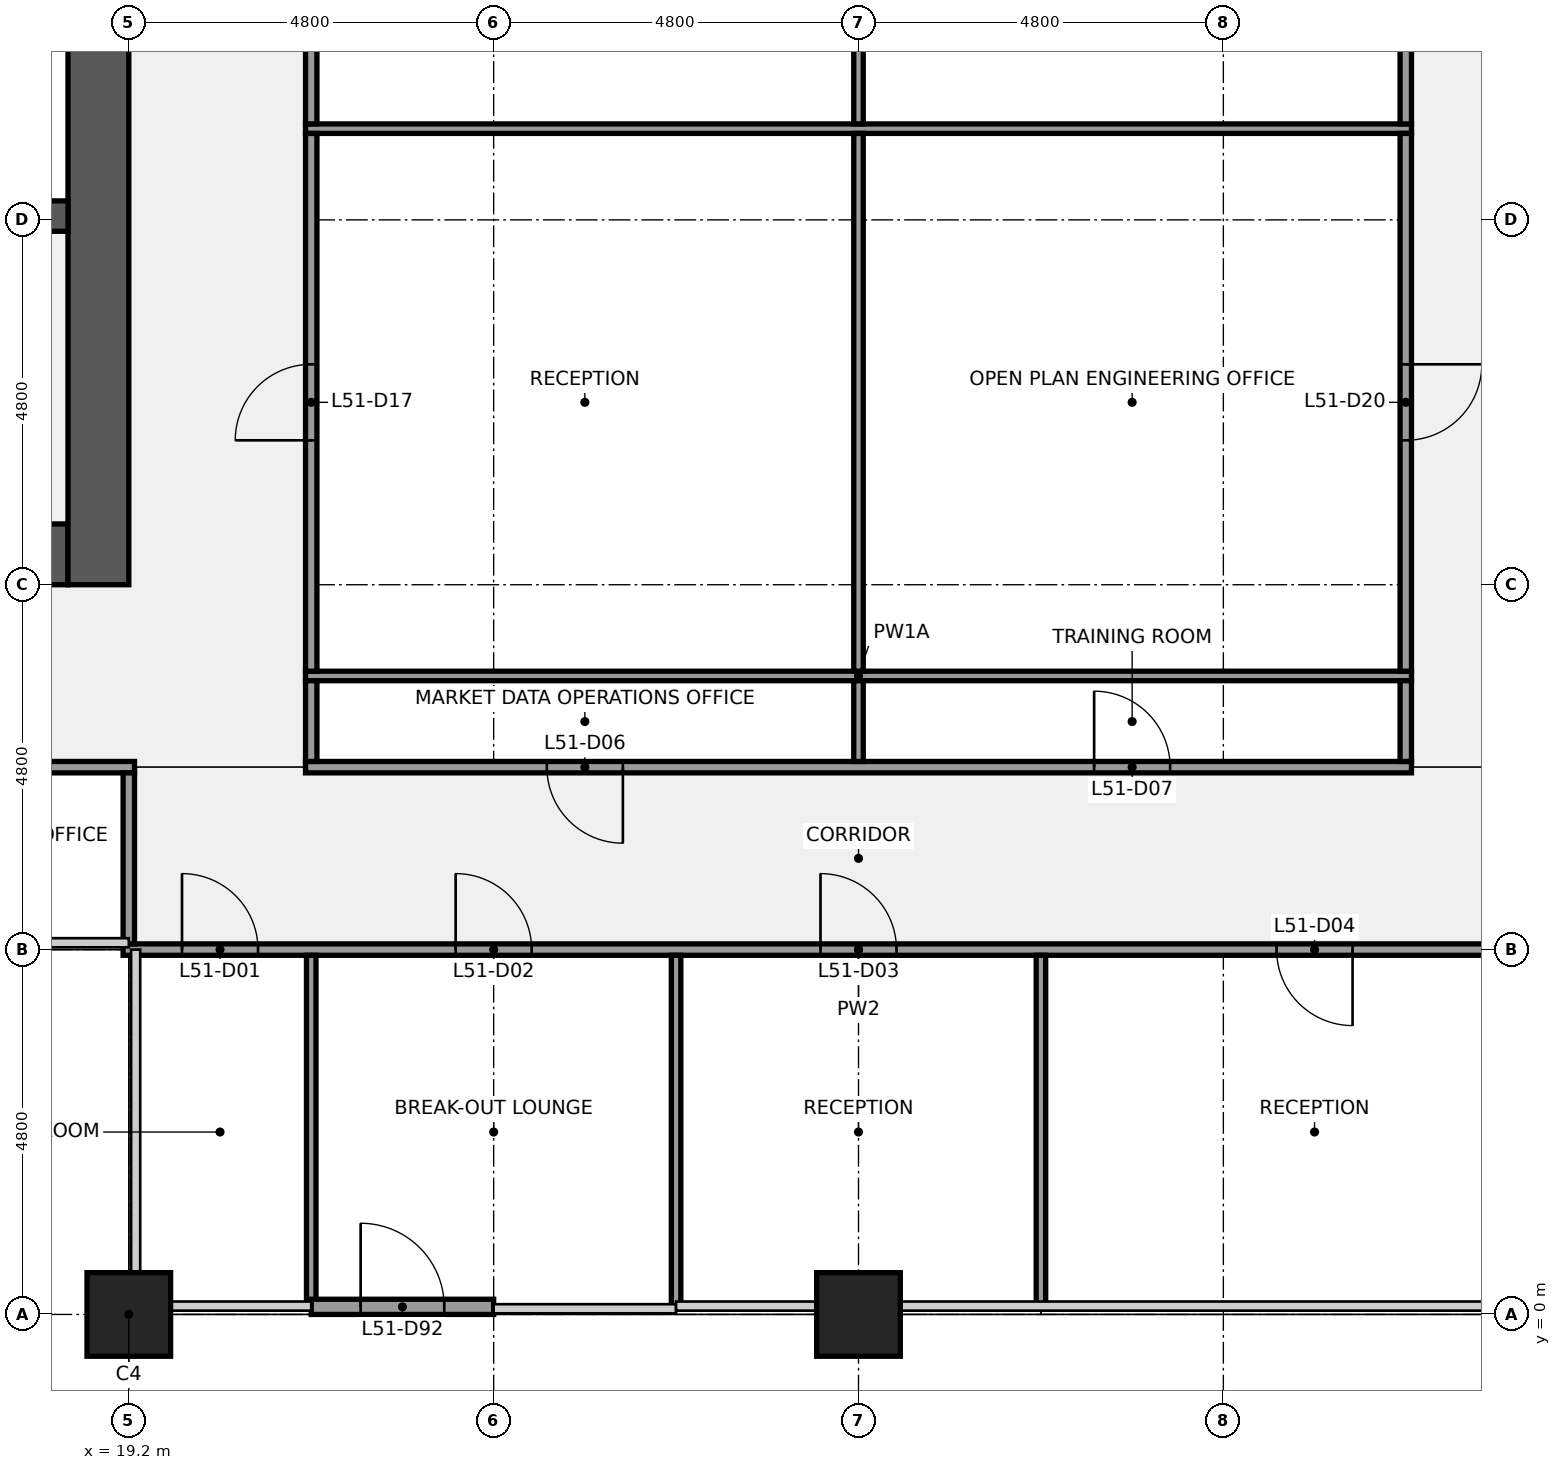
"""IFC4 building model, lengths in metres.
Left out: names, types, materials, properties, quantities, classifications, styles, units other than length and angle.
Written with IfcOpenShell. Run it as: python <this file> out.ifc"""

import sys

from ifc_helpers import new_model, si_unit, direction, frame, frame_2d, origin, origin_2d, place, context, subcontext, project, spatial, rectangle, extrude, element, fill, save


model = new_model("IFC4")
c1 = context("Model", 3, precision=1e-05, world=origin(), true_north=direction((0.0, 1.0)))
c2 = subcontext(c1, "Body", "Model", "MODEL_VIEW")
j1 = project(units=[si_unit("LENGTHUNIT", "METRE"), si_unit("PLANEANGLEUNIT", "RADIAN")], contexts=[c1])
p1 = place(None, origin())
s1 = spatial("IfcSite", under=j1, at=p1, CompositionType="ELEMENT")
p2 = place(p1, origin())
s2 = spatial("IfcBuilding", under=s1, at=p2, CompositionType="ELEMENT")
p3 = place(p2, frame((0.0, 0.0, 233.2)))
s3 = spatial("IfcBuildingStorey", under=s2, at=p3, CompositionType="ELEMENT", Elevation=233.2)
for number, where, z_axis, x_axis in (
    (1, (19.2, 0.0, 0.0), (0.0, 0.0, 1.0), (1.0, 0.0, 0.0)),
    (2, (28.8, 0.0, 0.0), (0.0, 0.0, 1.0), (1.0, 0.0, 0.0)),
):
    element("IfcColumn", number, at=place(p3, frame(where, z_axis=z_axis, x_axis=x_axis)), inside=s3, PredefinedType="COLUMN", context=c2, shape_type="SweptSolid", body=[
        extrude(rectangle(XDim=1.1, YDim=1.1, at=origin_2d()), origin(), (0.0, 0.0, 1.0), 4.0),
    ])
p4 = place(p3, frame((18.4, 10.0, 0.0), z_axis=(0.0, 0.0, 1.0), x_axis=(-1.0, 0.0, 0.0)))
e3 = element("IfcWall", 3, at=p4, inside=s3, PredefinedType="SHEAR", context=c2, shape_type="SweptSolid", body=[
    extrude(rectangle(XDim=4.0, YDim=0.8, at=frame_2d((2.0, 0.0))), origin(), (0.0, 0.0, 1.0), 3.84),
])
p5 = place(p4, frame((1.05, 0.0, 0.0)))
e4 = element("IfcOpeningElement", 4, at=p5, cuts=e3, PredefinedType="OPENING", context=c2, shape_type="SweptSolid", body=[
    extrude(rectangle(XDim=1.1, YDim=2.1, at=frame_2d((0.55, 1.05))), frame((0.0, 0.41, 0.0), z_axis=(0.0, -1.0, 0.0), x_axis=(1.0, 0.0, 0.0)), (0.0, 0.0, 1.0), 0.82),
])
p6 = place(p3, frame((18.8, 38.4, 0.0), z_axis=(0.0, 0.0, 1.0), x_axis=(0.0, -1.0, 0.0)))
e5 = element("IfcWall", 5, at=p6, inside=s3, PredefinedType="SHEAR", context=c2, shape_type="SweptSolid", body=[
    extrude(rectangle(XDim=28.8, YDim=0.8, at=frame_2d((14.4, 0.0))), origin(), (0.0, 0.0, 1.0), 3.84),
])
p7 = place(p6, frame((18.3, 0.0, 0.0)))
e6 = element("IfcOpeningElement", 6, at=p7, cuts=e5, PredefinedType="OPENING", context=c2, shape_type="SweptSolid", body=[
    extrude(rectangle(XDim=1.8, YDim=2.1, at=frame_2d((0.9, 1.05))), frame((0.0, 0.41, 0.0), z_axis=(0.0, -1.0, 0.0), x_axis=(1.0, 0.0, 0.0)), (0.0, 0.0, 1.0), 0.82),
])
p8 = place(p6, frame((8.7, 0.0, 0.0)))
e7 = element("IfcOpeningElement", 7, at=p8, cuts=e5, PredefinedType="OPENING", context=c2, shape_type="SweptSolid", body=[
    extrude(rectangle(XDim=1.8, YDim=2.1, at=frame_2d((0.9, 1.05))), frame((0.0, 0.41, 0.0), z_axis=(0.0, -1.0, 0.0), x_axis=(1.0, 0.0, 0.0)), (0.0, 0.0, 1.0), 0.82),
])
p9 = place(p3, frame((0.8, 14.45, 0.0), z_axis=(0.0, 0.0, 1.0), x_axis=(1.0, 0.0, 0.0)))
e8 = element("IfcWall", 8, at=p9, inside=s3, PredefinedType="SHEAR", context=c2, shape_type="SweptSolid", body=[
    extrude(rectangle(XDim=17.6, YDim=0.4, at=frame_2d((8.8, 0.0))), origin(), (0.0, 0.0, 1.0), 3.84),
])
p10 = place(p3, frame((19.125, 4.8, 0.0), z_axis=(0.0, 0.0, 1.0), x_axis=(1.0, 0.0, 0.0)))
e9 = element("IfcWall", 9, at=p10, inside=s3, PredefinedType="PARTITIONING", context=c2, shape_type="SweptSolid", body=[
    extrude(rectangle(XDim=19.35, YDim=0.15, at=frame_2d((9.675, 0.0))), origin(), (0.0, 0.0, 1.0), 2.87),
])
p11 = place(p10, frame((0.775, 0.0, 0.0)))
e10 = element("IfcOpeningElement", 10, at=p11, cuts=e9, PredefinedType="OPENING", context=c2, shape_type="SweptSolid", body=[
    extrude(rectangle(XDim=1.0, YDim=2.1, at=frame_2d((0.5, 1.05))), frame((0.0, 0.085, 0.0), z_axis=(0.0, -1.0, 0.0), x_axis=(1.0, 0.0, 0.0)), (0.0, 0.0, 1.0), 0.17),
])
p12 = place(p10, frame((4.375, 0.0, 0.0)))
e11 = element("IfcOpeningElement", 11, at=p12, cuts=e9, PredefinedType="OPENING", context=c2, shape_type="SweptSolid", body=[
    extrude(rectangle(XDim=1.0, YDim=2.1, at=frame_2d((0.5, 1.05))), frame((0.0, 0.085, 0.0), z_axis=(0.0, -1.0, 0.0), x_axis=(1.0, 0.0, 0.0)), (0.0, 0.0, 1.0), 0.17),
])
p13 = place(p10, frame((9.175, 0.0, 0.0)))
e12 = element("IfcOpeningElement", 12, at=p13, cuts=e9, PredefinedType="OPENING", context=c2, shape_type="SweptSolid", body=[
    extrude(rectangle(XDim=1.0, YDim=2.1, at=frame_2d((0.5, 1.05))), frame((0.0, 0.085, 0.0), z_axis=(0.0, -1.0, 0.0), x_axis=(1.0, 0.0, 0.0)), (0.0, 0.0, 1.0), 0.17),
])
p14 = place(p10, frame((15.175, 0.0, 0.0)))
e13 = element("IfcOpeningElement", 13, at=p14, cuts=e9, PredefinedType="OPENING", context=c2, shape_type="SweptSolid", body=[
    extrude(rectangle(XDim=1.0, YDim=2.1, at=frame_2d((0.5, 1.05))), frame((0.0, 0.085, 0.0), z_axis=(0.0, -1.0, 0.0), x_axis=(1.0, 0.0, 0.0)), (0.0, 0.0, 1.0), 0.17),
])
p15 = place(p3, frame((14.5, 7.2, 0.0), z_axis=(0.0, 0.0, 1.0), x_axis=(1.0, 0.0, 0.0)))
e14 = element("IfcWall", 14, at=p15, inside=s3, PredefinedType="PARTITIONING", context=c2, shape_type="SweptSolid", body=[
    extrude(rectangle(XDim=4.775, YDim=0.15, at=frame_2d((2.387, 0.0))), origin(), (0.0, 0.0, 1.0), 2.87),
])
p16 = place(p15, frame((1.85, 0.0, 0.0)))
e15 = element("IfcOpeningElement", 15, at=p16, cuts=e14, PredefinedType="OPENING", context=c2, shape_type="SweptSolid", body=[
    extrude(rectangle(XDim=1.0, YDim=2.1, at=frame_2d((0.5, 1.05))), frame((0.0, 0.085, 0.0), z_axis=(0.0, -1.0, 0.0), x_axis=(1.0, 0.0, 0.0)), (0.0, 0.0, 1.0), 0.17),
])
p17 = place(p3, frame((21.525, 7.2, 0.0), z_axis=(0.0, 0.0, 1.0), x_axis=(1.0, 0.0, 0.0)))
e16 = element("IfcWall", 16, at=p17, inside=s3, PredefinedType="PARTITIONING", context=c2, shape_type="SweptSolid", body=[
    extrude(rectangle(XDim=14.55, YDim=0.15, at=frame_2d((7.275, 0.0))), origin(), (0.0, 0.0, 1.0), 2.87),
])
p18 = place(p17, frame((3.175, 0.0, 0.0)))
e17 = element("IfcOpeningElement", 17, at=p18, cuts=e16, PredefinedType="OPENING", context=c2, shape_type="SweptSolid", body=[
    extrude(rectangle(XDim=1.0, YDim=2.1, at=frame_2d((0.5, 1.05))), frame((0.0, 0.085, 0.0), z_axis=(0.0, -1.0, 0.0), x_axis=(1.0, 0.0, 0.0)), (0.0, 0.0, 1.0), 0.17),
])
p19 = place(p17, frame((10.375, 0.0, 0.0)))
e18 = element("IfcOpeningElement", 18, at=p19, cuts=e16, PredefinedType="OPENING", context=c2, shape_type="SweptSolid", body=[
    extrude(rectangle(XDim=1.0, YDim=2.1, at=frame_2d((0.5, 1.05))), frame((0.0, 0.085, 0.0), z_axis=(0.0, -1.0, 0.0), x_axis=(1.0, 0.0, 0.0)), (0.0, 0.0, 1.0), 0.17),
])
for number, where, z_axis, x_axis in (
    (19, (21.525, 8.4, 0.0), (0.0, 0.0, 1.0), (1.0, 0.0, 0.0)),
    (20, (21.525, 15.6, 0.0), (0.0, 0.0, 1.0), (1.0, 0.0, 0.0)),
):
    element("IfcWall", number, at=place(p3, frame(where, z_axis=z_axis, x_axis=x_axis)), inside=s3, PredefinedType="PARTITIONING", context=c2, shape_type="SweptSolid", body=[
        extrude(rectangle(XDim=14.55, YDim=0.125, at=frame_2d((7.275, 0.0))), origin(), (0.0, 0.0, 1.0), 2.87),
    ])
p20 = place(p3, frame((19.2, 4.875, 0.0), z_axis=(0.0, 0.0, 1.0), x_axis=(0.0, 1.0, 0.0)))
e21 = element("IfcWall", 21, at=p20, inside=s3, PredefinedType="PARTITIONING", context=c2, shape_type="SweptSolid", body=[
    extrude(rectangle(XDim=2.25, YDim=0.15, at=frame_2d((1.125, 0.0))), origin(), (0.0, 0.0, 1.0), 2.87),
])
p21 = place(p3, frame((21.6, 0.1, 0.0), z_axis=(0.0, 0.0, 1.0), x_axis=(0.0, 1.0, 0.0)))
e22 = element("IfcWall", 22, at=p21, inside=s3, PredefinedType="PARTITIONING", context=c2, shape_type="SweptSolid", body=[
    extrude(rectangle(XDim=4.625, YDim=0.125, at=frame_2d((2.312, 0.0))), origin(), (0.0, 0.0, 1.0), 2.87),
])
p22 = place(p3, frame((21.6, 7.275, 0.0), z_axis=(0.0, 0.0, 1.0), x_axis=(0.0, 1.0, 0.0)))
e23 = element("IfcWall", 23, at=p22, inside=s3, PredefinedType="PARTITIONING", context=c2, shape_type="SweptSolid", body=[
    extrude(rectangle(XDim=1.062, YDim=0.15, at=frame_2d((0.531, 0.0))), origin(), (0.0, 0.0, 1.0), 2.87),
])
p23 = place(p3, frame((21.6, 8.462, 0.0), z_axis=(0.0, 0.0, 1.0), x_axis=(0.0, 1.0, 0.0)))
e24 = element("IfcWall", 24, at=p23, inside=s3, PredefinedType="PARTITIONING", context=c2, shape_type="SweptSolid", body=[
    extrude(rectangle(XDim=7.075, YDim=0.15, at=frame_2d((3.538, 0.0))), origin(), (0.0, 0.0, 1.0), 2.87),
])
p24 = place(p23, frame((3.038, 0.0, 0.0)))
e25 = element("IfcOpeningElement", 25, at=p24, cuts=e24, PredefinedType="OPENING", context=c2, shape_type="SweptSolid", body=[
    extrude(rectangle(XDim=1.0, YDim=2.1, at=frame_2d((0.5, 1.05))), frame((0.0, 0.085, 0.0), z_axis=(0.0, -1.0, 0.0), x_axis=(1.0, 0.0, 0.0)), (0.0, 0.0, 1.0), 0.17),
])
p25 = place(p3, frame((21.6, 15.663, 0.0), z_axis=(0.0, 0.0, 1.0), x_axis=(0.0, 1.0, 0.0)))
e26 = element("IfcWall", 26, at=p25, inside=s3, PredefinedType="PARTITIONING", context=c2, shape_type="SweptSolid", body=[
    extrude(rectangle(XDim=7.075, YDim=0.15, at=frame_2d((3.538, 0.0))), origin(), (0.0, 0.0, 1.0), 2.87),
])
p26 = place(p25, frame((3.038, 0.0, 0.0)))
e27 = element("IfcOpeningElement", 27, at=p26, cuts=e26, PredefinedType="OPENING", context=c2, shape_type="SweptSolid", body=[
    extrude(rectangle(XDim=1.0, YDim=2.1, at=frame_2d((0.5, 1.05))), frame((0.0, 0.085, 0.0), z_axis=(0.0, -1.0, 0.0), x_axis=(1.0, 0.0, 0.0)), (0.0, 0.0, 1.0), 0.17),
])
p27 = place(p3, frame((26.4, 0.1, 0.0), z_axis=(0.0, 0.0, 1.0), x_axis=(0.0, 1.0, 0.0)))
e28 = element("IfcWall", 28, at=p27, inside=s3, PredefinedType="PARTITIONING", context=c2, shape_type="SweptSolid", body=[
    extrude(rectangle(XDim=4.625, YDim=0.125, at=frame_2d((2.312, 0.0))), origin(), (0.0, 0.0, 1.0), 2.87),
])
p28 = place(p3, frame((28.8, 7.275, 0.0), z_axis=(0.0, 0.0, 1.0), x_axis=(0.0, 1.0, 0.0)))
e29 = element("IfcWall", 29, at=p28, inside=s3, PredefinedType="PARTITIONING", context=c2, shape_type="SweptSolid", body=[
    extrude(rectangle(XDim=1.062, YDim=0.125, at=frame_2d((0.531, 0.0))), origin(), (0.0, 0.0, 1.0), 2.87),
])
p29 = place(p3, frame((28.8, 8.462, 0.0), z_axis=(0.0, 0.0, 1.0), x_axis=(0.0, 1.0, 0.0)))
e30 = element("IfcWall", 30, at=p29, inside=s3, PredefinedType="PARTITIONING", context=c2, shape_type="SweptSolid", body=[
    extrude(rectangle(XDim=7.075, YDim=0.125, at=frame_2d((3.538, 0.0))), origin(), (0.0, 0.0, 1.0), 2.87),
])
p30 = place(p3, frame((28.8, 15.663, 0.0), z_axis=(0.0, 0.0, 1.0), x_axis=(0.0, 1.0, 0.0)))
e31 = element("IfcWall", 31, at=p30, inside=s3, PredefinedType="PARTITIONING", context=c2, shape_type="SweptSolid", body=[
    extrude(rectangle(XDim=7.075, YDim=0.125, at=frame_2d((3.538, 0.0))), origin(), (0.0, 0.0, 1.0), 2.87),
])
p31 = place(p3, frame((31.2, 0.1, 0.0), z_axis=(0.0, 0.0, 1.0), x_axis=(0.0, 1.0, 0.0)))
e32 = element("IfcWall", 32, at=p31, inside=s3, PredefinedType="PARTITIONING", context=c2, shape_type="SweptSolid", body=[
    extrude(rectangle(XDim=4.625, YDim=0.125, at=frame_2d((2.312, 0.0))), origin(), (0.0, 0.0, 1.0), 2.87),
])
p32 = place(p3, frame((36.0, 7.275, 0.0), z_axis=(0.0, 0.0, 1.0), x_axis=(0.0, 1.0, 0.0)))
e33 = element("IfcWall", 33, at=p32, inside=s3, PredefinedType="PARTITIONING", context=c2, shape_type="SweptSolid", body=[
    extrude(rectangle(XDim=1.062, YDim=0.15, at=frame_2d((0.531, 0.0))), origin(), (0.0, 0.0, 1.0), 2.87),
])
p33 = place(p3, frame((36.0, 8.462, 0.0), z_axis=(0.0, 0.0, 1.0), x_axis=(0.0, 1.0, 0.0)))
e34 = element("IfcWall", 34, at=p33, inside=s3, PredefinedType="PARTITIONING", context=c2, shape_type="SweptSolid", body=[
    extrude(rectangle(XDim=7.075, YDim=0.15, at=frame_2d((3.538, 0.0))), origin(), (0.0, 0.0, 1.0), 2.87),
])
p34 = place(p33, frame((3.038, 0.0, 0.0)))
e35 = element("IfcOpeningElement", 35, at=p34, cuts=e34, PredefinedType="OPENING", context=c2, shape_type="SweptSolid", body=[
    extrude(rectangle(XDim=1.0, YDim=2.1, at=frame_2d((0.5, 1.05))), frame((0.0, 0.085, 0.0), z_axis=(0.0, -1.0, 0.0), x_axis=(1.0, 0.0, 0.0)), (0.0, 0.0, 1.0), 0.17),
])
p35 = place(p3, frame((36.0, 15.663, 0.0), z_axis=(0.0, 0.0, 1.0), x_axis=(0.0, 1.0, 0.0)))
e36 = element("IfcWall", 36, at=p35, inside=s3, PredefinedType="PARTITIONING", context=c2, shape_type="SweptSolid", body=[
    extrude(rectangle(XDim=7.075, YDim=0.15, at=frame_2d((3.538, 0.0))), origin(), (0.0, 0.0, 1.0), 2.87),
])
p36 = place(p35, frame((3.038, 0.0, 0.0)))
e37 = element("IfcOpeningElement", 37, at=p36, cuts=e36, PredefinedType="OPENING", context=c2, shape_type="SweptSolid", body=[
    extrude(rectangle(XDim=1.0, YDim=2.1, at=frame_2d((0.5, 1.05))), frame((0.0, 0.085, 0.0), z_axis=(0.0, -1.0, 0.0), x_axis=(1.0, 0.0, 0.0)), (0.0, 0.0, 1.0), 0.17),
])
p37 = place(p3, frame((21.6, 0.1, 0.0), z_axis=(0.0, 0.0, 1.0), x_axis=(1.0, 0.0, 0.0)))
e38 = element("IfcWall", 38, at=p37, inside=s3, PredefinedType="SOLIDWALL", context=c2, shape_type="SweptSolid", body=[
    extrude(rectangle(XDim=2.4, YDim=0.2, at=frame_2d((1.2, 0.0))), origin(), (0.0, 0.0, 1.0), 3.314),
])
p38 = place(p37, frame((0.65, 0.0, 0.0)))
e39 = element("IfcOpeningElement", 39, at=p38, cuts=e38, PredefinedType="OPENING", context=c2, shape_type="SweptSolid", body=[
    extrude(rectangle(XDim=1.1, YDim=2.1, at=frame_2d((0.55, 1.05))), frame((0.0, 0.11, 0.0), z_axis=(0.0, -1.0, 0.0), x_axis=(1.0, 0.0, 0.0)), (0.0, 0.0, 1.0), 0.22),
])
p39 = place(p3, frame((19.2, -1.025, 0.0), z_axis=(0.0, 0.0, 1.0), x_axis=(1.0, 0.0, 0.0)))
e40 = element("IfcColumn", 40, at=p39, inside=s3, PredefinedType="PILASTER", context=c2, shape_type="SweptSolid", body=[
    extrude(rectangle(XDim=2.4, YDim=0.95, at=origin_2d()), origin(), (0.0, 0.0, 1.0), 4.0),
])
p40 = place(p11, origin())
e41 = element("IfcDoor", 41, at=p40, inside=s3, OperationType="SINGLE_SWING_LEFT", PredefinedType="DOOR", context=c2, shape_type="SweptSolid", body=[
    extrude(rectangle(XDim=1.0, YDim=2.1, at=frame_2d((0.5, 1.05))), frame((0.0, 0.025, 0.0), z_axis=(0.0, -1.0, 0.0), x_axis=(1.0, 0.0, 0.0)), (0.0, 0.0, 1.0), 0.05),
])
fill(e10, e41)
p41 = place(p12, origin())
e42 = element("IfcDoor", 42, at=p41, inside=s3, OperationType="SINGLE_SWING_LEFT", PredefinedType="DOOR", context=c2, shape_type="SweptSolid", body=[
    extrude(rectangle(XDim=1.0, YDim=2.1, at=frame_2d((0.5, 1.05))), frame((0.0, 0.025, 0.0), z_axis=(0.0, -1.0, 0.0), x_axis=(1.0, 0.0, 0.0)), (0.0, 0.0, 1.0), 0.05),
])
fill(e11, e42)
p42 = place(p13, origin())
e43 = element("IfcDoor", 43, at=p42, inside=s3, OperationType="SINGLE_SWING_LEFT", PredefinedType="DOOR", context=c2, shape_type="SweptSolid", body=[
    extrude(rectangle(XDim=1.0, YDim=2.1, at=frame_2d((0.5, 1.05))), frame((0.0, 0.025, 0.0), z_axis=(0.0, -1.0, 0.0), x_axis=(1.0, 0.0, 0.0)), (0.0, 0.0, 1.0), 0.05),
])
fill(e12, e43)
p43 = place(p14, origin())
e44 = element("IfcDoor", 44, at=p43, inside=s3, OperationType="SINGLE_SWING_RIGHT", PredefinedType="DOOR", context=c2, shape_type="SweptSolid", body=[
    extrude(rectangle(XDim=1.0, YDim=2.1, at=frame_2d((0.5, 1.05))), frame((0.0, 0.025, 0.0), z_axis=(0.0, -1.0, 0.0), x_axis=(1.0, 0.0, 0.0)), (0.0, 0.0, 1.0), 0.05),
])
fill(e13, e44)
p44 = place(p18, origin())
e45 = element("IfcDoor", 45, at=p44, inside=s3, OperationType="SINGLE_SWING_RIGHT", PredefinedType="DOOR", context=c2, shape_type="SweptSolid", body=[
    extrude(rectangle(XDim=1.0, YDim=2.1, at=frame_2d((0.5, 1.05))), frame((0.0, 0.025, 0.0), z_axis=(0.0, -1.0, 0.0), x_axis=(1.0, 0.0, 0.0)), (0.0, 0.0, 1.0), 0.05),
])
fill(e17, e45)
p45 = place(p19, origin())
e46 = element("IfcDoor", 46, at=p45, inside=s3, OperationType="SINGLE_SWING_LEFT", PredefinedType="DOOR", context=c2, shape_type="SweptSolid", body=[
    extrude(rectangle(XDim=1.0, YDim=2.1, at=frame_2d((0.5, 1.05))), frame((0.0, 0.025, 0.0), z_axis=(0.0, -1.0, 0.0), x_axis=(1.0, 0.0, 0.0)), (0.0, 0.0, 1.0), 0.05),
])
fill(e18, e46)
p46 = place(p24, origin())
e47 = element("IfcDoor", 47, at=p46, inside=s3, OperationType="SINGLE_SWING_LEFT", PredefinedType="DOOR", context=c2, shape_type="SweptSolid", body=[
    extrude(rectangle(XDim=1.0, YDim=2.1, at=frame_2d((0.5, 1.05))), frame((0.0, 0.025, 0.0), z_axis=(0.0, -1.0, 0.0), x_axis=(1.0, 0.0, 0.0)), (0.0, 0.0, 1.0), 0.05),
])
fill(e25, e47)
p47 = place(p34, origin())
e48 = element("IfcDoor", 48, at=p47, inside=s3, OperationType="SINGLE_SWING_RIGHT", PredefinedType="DOOR", context=c2, shape_type="SweptSolid", body=[
    extrude(rectangle(XDim=1.0, YDim=2.1, at=frame_2d((0.5, 1.05))), frame((0.0, 0.025, 0.0), z_axis=(0.0, -1.0, 0.0), x_axis=(1.0, 0.0, 0.0)), (0.0, 0.0, 1.0), 0.05),
])
fill(e35, e48)
p48 = place(p38, origin())
e49 = element("IfcDoor", 49, at=p48, inside=s3, OperationType="SINGLE_SWING_LEFT", PredefinedType="DOOR", context=c2, shape_type="SweptSolid", body=[
    extrude(rectangle(XDim=1.1, YDim=2.1, at=frame_2d((0.55, 1.05))), frame((0.0, 0.025, 0.0), z_axis=(0.0, -1.0, 0.0), x_axis=(1.0, 0.0, 0.0)), (0.0, 0.0, 1.0), 0.05),
])
fill(e39, e49)
save(model, sys.argv[1])
